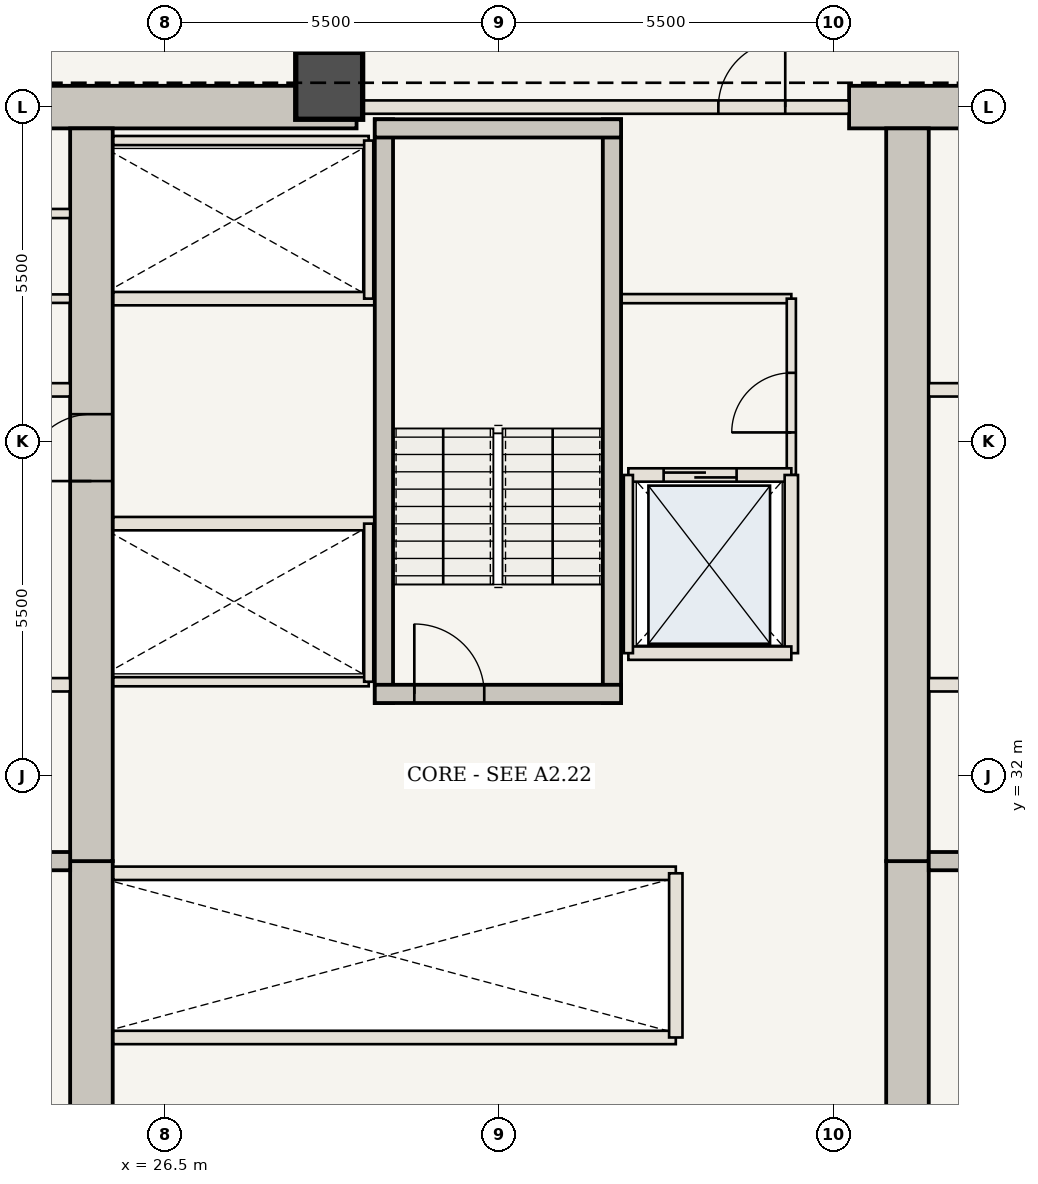
"""IFC4 building model, lengths in metres.
Left out: names, types, materials, properties, quantities, classifications, styles, units other than length and angle.
Written with IfcOpenShell. Run it as: python <this file> out.ifc"""

import sys

from ifc_helpers import new_model, si_unit, direction, frame, frame_2d, origin, origin_2d, place, context, subcontext, project, spatial, rectangle, extrude, element, fill, save


model = new_model("IFC4")
c1 = context("Model", 3, precision=1e-05, world=origin(), true_north=direction((0.0, 1.0)))
c2 = subcontext(c1, "Body", "Model", "MODEL_VIEW")
j1 = project(units=[si_unit("LENGTHUNIT", "METRE"), si_unit("PLANEANGLEUNIT", "RADIAN")], contexts=[c1])
p1 = place(None, origin())
s1 = spatial("IfcSite", under=j1, at=p1, CompositionType="ELEMENT")
p2 = place(p1, origin())
s2 = spatial("IfcBuilding", under=s1, at=p2, CompositionType="ELEMENT")
p3 = place(p2, frame((0.0, 0.0, 89.25)))
s3 = spatial("IfcBuildingStorey", under=s2, at=p3, CompositionType="ELEMENT", Elevation=89.25)
p4 = place(p3, frame((21.41, 43.0, 0.0), z_axis=(0.0, 0.0, 1.0), x_axis=(1.0, 0.0, 0.0)))
e1 = element("IfcWall", 1, at=p4, inside=s3, PredefinedType="SHEAR", context=c2, shape_type="SweptSolid", body=[
    extrude(rectangle(XDim=8.24, YDim=0.7, at=frame_2d((4.12, 0.0))), origin(), (0.0, 0.0, 1.0), 3.5),
])
p5 = place(p3, frame((37.75, 43.0, 0.0), z_axis=(0.0, 0.0, 1.0), x_axis=(1.0, 0.0, 0.0)))
e2 = element("IfcWall", 2, at=p5, inside=s3, PredefinedType="SHEAR", context=c2, shape_type="SweptSolid", body=[
    extrude(rectangle(XDim=4.84, YDim=0.7, at=frame_2d((2.42, 0.0))), origin(), (0.0, 0.0, 1.0), 3.5),
])
p6 = place(p3, frame((25.29, 21.3, 0.0), z_axis=(0.0, 0.0, 1.0), x_axis=(0.0, 1.0, 0.0)))
e3 = element("IfcWall", 3, at=p6, inside=s3, PredefinedType="SHEAR", context=c2, shape_type="SweptSolid", body=[
    extrude(rectangle(XDim=9.3, YDim=0.7, at=frame_2d((4.65, 0.0))), origin(), (0.0, 0.0, 1.0), 3.5),
])
p7 = place(p3, frame((25.29, 30.6, 0.0), z_axis=(0.0, 0.0, 1.0), x_axis=(0.0, 1.0, 0.0)))
e4 = element("IfcWall", 4, at=p7, inside=s3, PredefinedType="SHEAR", context=c2, shape_type="SweptSolid", body=[
    extrude(rectangle(XDim=12.05, YDim=0.7, at=frame_2d((6.025, 0.0))), origin(), (0.0, 0.0, 1.0), 3.5),
])
p8 = place(p7, frame((6.25, 0.0, 0.0)))
e5 = element("IfcOpeningElement", 5, at=p8, cuts=e4, PredefinedType="OPENING", context=c2, shape_type="SweptSolid", body=[
    extrude(rectangle(XDim=1.1, YDim=2.15, at=frame_2d((0.55, 1.075))), frame((0.0, 0.36, 0.0), z_axis=(0.0, -1.0, 0.0), x_axis=(1.0, 0.0, 0.0)), (0.0, 0.0, 1.0), 0.72),
])
p9 = place(p3, frame((38.71, 21.3, 0.0), z_axis=(0.0, 0.0, 1.0), x_axis=(0.0, 1.0, 0.0)))
e6 = element("IfcWall", 6, at=p9, inside=s3, PredefinedType="SHEAR", context=c2, shape_type="SweptSolid", body=[
    extrude(rectangle(XDim=9.3, YDim=0.7, at=frame_2d((4.65, 0.0))), origin(), (0.0, 0.0, 1.0), 3.5),
])
p10 = place(p3, frame((38.71, 30.6, 0.0), z_axis=(0.0, 0.0, 1.0), x_axis=(0.0, 1.0, 0.0)))
e7 = element("IfcWall", 7, at=p10, inside=s3, PredefinedType="SHEAR", context=c2, shape_type="SweptSolid", body=[
    extrude(rectangle(XDim=12.05, YDim=0.7, at=frame_2d((6.025, 0.0))), origin(), (0.0, 0.0, 1.0), 3.5),
])
p11 = place(p3, frame((29.2, 43.35, 0.0), z_axis=(0.0, 0.0, 1.0), x_axis=(1.0, 0.0, 0.0)))
e8 = element("IfcColumn", 8, at=p11, inside=s3, PredefinedType="COLUMN", context=c2, shape_type="SweptSolid", body=[
    extrude(rectangle(XDim=1.1, YDim=1.1, at=origin_2d()), origin(), (0.0, 0.0, 1.0), 3.5),
])
for number, where, z_axis, x_axis in (
    (9, (21.41, 30.6, 0.0), (0.0, 0.0, 1.0), (1.0, 0.0, 0.0)),
    (10, (39.06, 30.6, 0.0), (0.0, 0.0, 1.0), (1.0, 0.0, 0.0)),
):
    element("IfcWall", number, at=place(p3, frame(where, z_axis=z_axis, x_axis=x_axis)), inside=s3, PredefinedType="SHEAR", context=c2, shape_type="SweptSolid", body=[
        extrude(rectangle(XDim=3.53, YDim=0.3, at=frame_2d((1.765, 0.0))), origin(), (0.0, 0.0, 1.0), 3.32),
    ])
p12 = place(p3, frame((21.41, 33.5, 0.0), z_axis=(0.0, 0.0, 1.0), x_axis=(1.0, 0.0, 0.0)))
e11 = element("IfcWall", 11, at=p12, inside=s3, PredefinedType="STANDARD", context=c2, shape_type="SweptSolid", body=[
    extrude(rectangle(XDim=3.53, YDim=0.22, at=frame_2d((1.765, 0.0))), origin(), (0.0, 0.0, 1.0), 3.32),
])
p13 = place(p12, frame((0.75, 0.0, 0.0)))
e12 = element("IfcOpeningElement", 12, at=p13, cuts=e11, PredefinedType="OPENING", context=c2, shape_type="SweptSolid", body=[
    extrude(rectangle(XDim=1.2, YDim=2.2, at=frame_2d((0.6, 1.1))), frame((0.0, 0.12, 0.0), z_axis=(0.0, -1.0, 0.0), x_axis=(1.0, 0.0, 0.0)), (0.0, 0.0, 1.0), 0.24),
])
p14 = place(p3, frame((39.06, 33.5, 0.0), z_axis=(0.0, 0.0, 1.0), x_axis=(1.0, 0.0, 0.0)))
e13 = element("IfcWall", 13, at=p14, inside=s3, PredefinedType="STANDARD", context=c2, shape_type="SweptSolid", body=[
    extrude(rectangle(XDim=3.53, YDim=0.22, at=frame_2d((1.765, 0.0))), origin(), (0.0, 0.0, 1.0), 3.32),
])
p15 = place(p14, frame((1.55, 0.0, 0.0)))
e14 = element("IfcOpeningElement", 14, at=p15, cuts=e13, PredefinedType="OPENING", context=c2, shape_type="SweptSolid", body=[
    extrude(rectangle(XDim=1.2, YDim=2.2, at=frame_2d((0.6, 1.1))), frame((0.0, 0.12, 0.0), z_axis=(0.0, -1.0, 0.0), x_axis=(1.0, 0.0, 0.0)), (0.0, 0.0, 1.0), 0.24),
])
for number, where, z_axis, x_axis in (
    (15, (21.41, 38.35, 0.0), (0.0, 0.0, 1.0), (1.0, 0.0, 0.0)),
    (16, (39.06, 38.35, 0.0), (0.0, 0.0, 1.0), (1.0, 0.0, 0.0)),
):
    element("IfcWall", number, at=place(p3, frame(where, z_axis=z_axis, x_axis=x_axis)), inside=s3, PredefinedType="STANDARD", context=c2, shape_type="SweptSolid", body=[
        extrude(rectangle(XDim=3.53, YDim=0.22, at=frame_2d((1.765, 0.0))), origin(), (0.0, 0.0, 1.0), 3.32),
    ])
p16 = place(p3, frame((21.41, 39.85, 0.0), z_axis=(0.0, 0.0, 1.0), x_axis=(1.0, 0.0, 0.0)))
e17 = element("IfcWall", 17, at=p16, inside=s3, PredefinedType="STANDARD", context=c2, shape_type="SweptSolid", body=[
    extrude(rectangle(XDim=3.53, YDim=0.14, at=frame_2d((1.765, 0.0))), origin(), (0.0, 0.0, 1.0), 3.32),
])
p17 = place(p3, frame((21.41, 41.25, 0.0), z_axis=(0.0, 0.0, 1.0), x_axis=(1.0, 0.0, 0.0)))
e18 = element("IfcWall", 18, at=p17, inside=s3, PredefinedType="STANDARD", context=c2, shape_type="SweptSolid", body=[
    extrude(rectangle(XDim=3.53, YDim=0.15, at=frame_2d((1.765, 0.0))), origin(), (0.0, 0.0, 1.0), 3.32),
])
p18 = place(p3, frame((34.0, 39.85, 0.0), z_axis=(0.0, 0.0, 1.0), x_axis=(1.0, 0.0, 0.0)))
e19 = element("IfcWall", 19, at=p18, inside=s3, PredefinedType="STANDARD", context=c2, shape_type="SweptSolid", body=[
    extrude(rectangle(XDim=2.8, YDim=0.15, at=frame_2d((1.4, 0.0))), origin(), (0.0, 0.0, 1.0), 3.32),
])
p19 = place(p3, frame((36.8, 36.95, 0.0), z_axis=(0.0, 0.0, 1.0), x_axis=(0.0, 1.0, 0.0)))
e20 = element("IfcWall", 20, at=p19, inside=s3, PredefinedType="STANDARD", context=c2, shape_type="SweptSolid", body=[
    extrude(rectangle(XDim=2.9, YDim=0.15, at=frame_2d((1.45, 0.0))), origin(), (0.0, 0.0, 1.0), 3.32),
])
p20 = place(p19, frame((0.7, 0.0, 0.0)))
e21 = element("IfcOpeningElement", 21, at=p20, cuts=e20, PredefinedType="OPENING", context=c2, shape_type="SweptSolid", body=[
    extrude(rectangle(XDim=0.98, YDim=2.2, at=frame_2d((0.49, 1.1))), frame((0.0, 0.085, 0.0), z_axis=(0.0, -1.0, 0.0), x_axis=(1.0, 0.0, 0.0)), (0.0, 0.0, 1.0), 0.17),
])
for number, where, z_axis, x_axis in (
    (22, (25.65, 27.7, 0.0), (0.0, 0.0, 1.0), (1.0, 0.0, 0.0)),
    (23, (25.65, 30.4, 0.0), (0.0, 0.0, 1.0), (1.0, 0.0, 0.0)),
):
    element("IfcWall", number, at=place(p3, frame(where, z_axis=z_axis, x_axis=x_axis)), inside=s3, PredefinedType="STANDARD", context=c2, shape_type="SweptSolid", body=[
        extrude(rectangle(XDim=9.25, YDim=0.22, at=frame_2d((4.625, 0.0))), origin(), (0.0, 0.0, 1.0), 3.32),
    ])
p21 = place(p3, frame((34.9, 27.7, 0.0), z_axis=(0.0, 0.0, 1.0), x_axis=(0.0, 1.0, 0.0)))
e24 = element("IfcWall", 24, at=p21, inside=s3, PredefinedType="STANDARD", context=c2, shape_type="SweptSolid", body=[
    extrude(rectangle(XDim=2.7, YDim=0.22, at=frame_2d((1.35, 0.0))), origin(), (0.0, 0.0, 1.0), 3.32),
])
p22 = place(p3, frame((25.65, 36.15, 0.0), z_axis=(0.0, 0.0, 1.0), x_axis=(1.0, 0.0, 0.0)))
e25 = element("IfcWall", 25, at=p22, inside=s3, PredefinedType="STANDARD", context=c2, shape_type="SweptSolid", body=[
    extrude(rectangle(XDim=4.3, YDim=0.22, at=frame_2d((2.15, 0.0))), origin(), (0.0, 0.0, 1.0), 3.32),
])
p23 = place(p3, frame((25.65, 33.55, 0.0), z_axis=(0.0, 0.0, 1.0), x_axis=(1.0, 0.0, 0.0)))
e26 = element("IfcWall", 26, at=p23, inside=s3, PredefinedType="STANDARD", context=c2, shape_type="SweptSolid", body=[
    extrude(rectangle(XDim=4.2, YDim=0.15, at=frame_2d((2.1, 0.0))), origin(), (0.0, 0.0, 1.0), 3.32),
])
p24 = place(p3, frame((29.85, 33.55, 0.0), z_axis=(0.0, 0.0, 1.0), x_axis=(0.0, 1.0, 0.0)))
e27 = element("IfcWall", 27, at=p24, inside=s3, PredefinedType="STANDARD", context=c2, shape_type="SweptSolid", body=[
    extrude(rectangle(XDim=2.6, YDim=0.15, at=frame_2d((1.3, 0.0))), origin(), (0.0, 0.0, 1.0), 3.32),
])
p25 = place(p3, frame((25.65, 39.85, 0.0), z_axis=(0.0, 0.0, 1.0), x_axis=(1.0, 0.0, 0.0)))
e28 = element("IfcWall", 28, at=p25, inside=s3, PredefinedType="STANDARD", context=c2, shape_type="SweptSolid", body=[
    extrude(rectangle(XDim=4.3, YDim=0.22, at=frame_2d((2.15, 0.0))), origin(), (0.0, 0.0, 1.0), 3.32),
])
p26 = place(p3, frame((25.65, 42.45, 0.0), z_axis=(0.0, 0.0, 1.0), x_axis=(1.0, 0.0, 0.0)))
e29 = element("IfcWall", 29, at=p26, inside=s3, PredefinedType="STANDARD", context=c2, shape_type="SweptSolid", body=[
    extrude(rectangle(XDim=4.2, YDim=0.15, at=frame_2d((2.1, 0.0))), origin(), (0.0, 0.0, 1.0), 3.32),
])
p27 = place(p3, frame((29.85, 39.85, 0.0), z_axis=(0.0, 0.0, 1.0), x_axis=(0.0, 1.0, 0.0)))
e30 = element("IfcWall", 30, at=p27, inside=s3, PredefinedType="STANDARD", context=c2, shape_type="SweptSolid", body=[
    extrude(rectangle(XDim=2.6, YDim=0.15, at=frame_2d((1.3, 0.0))), origin(), (0.0, 0.0, 1.0), 3.32),
])
for number, where, z_axis, x_axis in (
    (31, (30.1, 33.2, 0.0), (0.0, 0.0, 1.0), (0.0, 1.0, 0.0)),
    (32, (33.85, 33.2, 0.0), (0.0, 0.0, 1.0), (0.0, 1.0, 0.0)),
):
    element("IfcWall", number, at=place(p3, frame(where, z_axis=z_axis, x_axis=x_axis)), inside=s3, PredefinedType="SHEAR", context=c2, shape_type="SweptSolid", body=[
        extrude(rectangle(XDim=9.6, YDim=0.3, at=frame_2d((4.8, 0.0))), origin(), (0.0, 0.0, 1.0), 3.32),
    ])
p28 = place(p3, frame((29.95, 33.35, 0.0), z_axis=(0.0, 0.0, 1.0), x_axis=(1.0, 0.0, 0.0)))
e33 = element("IfcWall", 33, at=p28, inside=s3, PredefinedType="SHEAR", context=c2, shape_type="SweptSolid", body=[
    extrude(rectangle(XDim=4.05, YDim=0.3, at=frame_2d((2.025, 0.0))), origin(), (0.0, 0.0, 1.0), 3.32),
])
p29 = place(p28, frame((0.65, 0.0, 0.0)))
e34 = element("IfcOpeningElement", 34, at=p29, cuts=e33, PredefinedType="OPENING", context=c2, shape_type="SweptSolid", body=[
    extrude(rectangle(XDim=1.15, YDim=2.15, at=frame_2d((0.575, 1.075))), frame((0.0, 0.16, 0.0), z_axis=(0.0, -1.0, 0.0), x_axis=(1.0, 0.0, 0.0)), (0.0, 0.0, 1.0), 0.32),
])
p30 = place(p3, frame((29.95, 42.65, 0.0), z_axis=(0.0, 0.0, 1.0), x_axis=(1.0, 0.0, 0.0)))
e35 = element("IfcWall", 35, at=p30, inside=s3, PredefinedType="SHEAR", context=c2, shape_type="SweptSolid", body=[
    extrude(rectangle(XDim=4.05, YDim=0.3, at=frame_2d((2.025, 0.0))), origin(), (0.0, 0.0, 1.0), 3.32),
])
p31 = place(p3, frame((29.65, 43.0, 0.0), z_axis=(0.0, 0.0, 1.0), x_axis=(1.0, 0.0, 0.0)))
e36 = element("IfcWall", 36, at=p31, inside=s3, PredefinedType="STANDARD", context=c2, shape_type="SweptSolid", body=[
    extrude(rectangle(XDim=8.1, YDim=0.22, at=frame_2d((4.05, 0.0))), origin(), (0.0, 0.0, 1.0), 3.32),
])
p32 = place(p31, frame((5.95, 0.0, 0.0)))
e37 = element("IfcOpeningElement", 37, at=p32, cuts=e36, PredefinedType="OPENING", context=c2, shape_type="SweptSolid", body=[
    extrude(rectangle(XDim=1.1, YDim=2.15, at=frame_2d((0.55, 1.075))), frame((0.0, 0.12, 0.0), z_axis=(0.0, -1.0, 0.0), x_axis=(1.0, 0.0, 0.0)), (0.0, 0.0, 1.0), 0.24),
])
p33 = place(p3, frame((34.12, 36.95, 0.0), z_axis=(0.0, 0.0, 1.0), x_axis=(1.0, 0.0, 0.0)))
e38 = element("IfcWall", 38, at=p33, inside=s3, PredefinedType="STANDARD", context=c2, shape_type="SweptSolid", body=[
    extrude(rectangle(XDim=2.68, YDim=0.22, at=frame_2d((1.34, 0.0))), origin(), (0.0, 0.0, 1.0), 3.32),
])
p34 = place(p33, frame((0.58, 0.0, 0.0)))
e39 = element("IfcOpeningElement", 39, at=p34, cuts=e38, PredefinedType="OPENING", context=c2, shape_type="SweptSolid", body=[
    extrude(rectangle(XDim=1.2, YDim=2.2, at=frame_2d((0.6, 1.1))), frame((0.0, 0.12, 0.0), z_axis=(0.0, -1.0, 0.0), x_axis=(1.0, 0.0, 0.0)), (0.0, 0.0, 1.0), 0.24),
])
p35 = place(p3, frame((36.8, 34.02, 0.0), z_axis=(0.0, 0.0, 1.0), x_axis=(0.0, 1.0, 0.0)))
e40 = element("IfcWall", 40, at=p35, inside=s3, PredefinedType="STANDARD", context=c2, shape_type="SweptSolid", body=[
    extrude(rectangle(XDim=2.93, YDim=0.22, at=frame_2d((1.465, 0.0))), origin(), (0.0, 0.0, 1.0), 3.32),
])
p36 = place(p3, frame((34.12, 34.02, 0.0), z_axis=(0.0, 0.0, 1.0), x_axis=(1.0, 0.0, 0.0)))
e41 = element("IfcWall", 41, at=p36, inside=s3, PredefinedType="STANDARD", context=c2, shape_type="SweptSolid", body=[
    extrude(rectangle(XDim=2.68, YDim=0.22, at=frame_2d((1.34, 0.0))), origin(), (0.0, 0.0, 1.0), 3.32),
])
p37 = place(p3, frame((34.12, 34.02, 0.0), z_axis=(0.0, 0.0, 1.0), x_axis=(0.0, 1.0, 0.0)))
e42 = element("IfcWall", 42, at=p37, inside=s3, PredefinedType="STANDARD", context=c2, shape_type="SweptSolid", body=[
    extrude(rectangle(XDim=2.93, YDim=0.15, at=frame_2d((1.465, 0.0))), origin(), (0.0, 0.0, 1.0), 3.32),
])
p38 = place(p8, origin())
e43 = element("IfcDoor", 43, at=p38, inside=s3, OperationType="SINGLE_SWING_LEFT", PredefinedType="DOOR", context=c2, shape_type="SweptSolid", body=[
    extrude(rectangle(XDim=1.1, YDim=2.15, at=frame_2d((0.55, 1.075))), frame((0.0, 0.025, 0.0), z_axis=(0.0, -1.0, 0.0), x_axis=(1.0, 0.0, 0.0)), (0.0, 0.0, 1.0), 0.05),
])
fill(e5, e43)
p39 = place(p20, origin())
e44 = element("IfcDoor", 44, at=p39, inside=s3, OperationType="SINGLE_SWING_LEFT", PredefinedType="DOOR", context=c2, shape_type="SweptSolid", body=[
    extrude(rectangle(XDim=0.98, YDim=2.2, at=frame_2d((0.49, 1.1))), frame((0.0, 0.025, 0.0), z_axis=(0.0, -1.0, 0.0), x_axis=(1.0, 0.0, 0.0)), (0.0, 0.0, 1.0), 0.05),
])
fill(e21, e44)
p40 = place(p29, origin())
e45 = element("IfcDoor", 45, at=p40, inside=s3, OperationType="SINGLE_SWING_LEFT", PredefinedType="DOOR", context=c2, shape_type="SweptSolid", body=[
    extrude(rectangle(XDim=1.15, YDim=2.15, at=frame_2d((0.575, 1.075))), frame((0.0, 0.025, 0.0), z_axis=(0.0, -1.0, 0.0), x_axis=(1.0, 0.0, 0.0)), (0.0, 0.0, 1.0), 0.05),
])
fill(e34, e45)
p41 = place(p32, origin())
e46 = element("IfcDoor", 46, at=p41, inside=s3, OperationType="SINGLE_SWING_RIGHT", PredefinedType="DOOR", context=c2, shape_type="SweptSolid", body=[
    extrude(rectangle(XDim=1.1, YDim=2.15, at=frame_2d((0.55, 1.075))), frame((0.0, 0.025, 0.0), z_axis=(0.0, -1.0, 0.0), x_axis=(1.0, 0.0, 0.0)), (0.0, 0.0, 1.0), 0.05),
])
fill(e37, e46)
p42 = place(p34, origin())
e47 = element("IfcDoor", 47, at=p42, inside=s3, OperationType="DOUBLE_DOOR_SLIDING", PredefinedType="DOOR", context=c2, shape_type="SweptSolid", body=[
    extrude(rectangle(XDim=1.2, YDim=2.2, at=frame_2d((0.6, 1.1))), frame((0.0, 0.025, 0.0), z_axis=(0.0, -1.0, 0.0), x_axis=(1.0, 0.0, 0.0)), (0.0, 0.0, 1.0), 0.05),
])
fill(e39, e47)
save(model, sys.argv[1])
